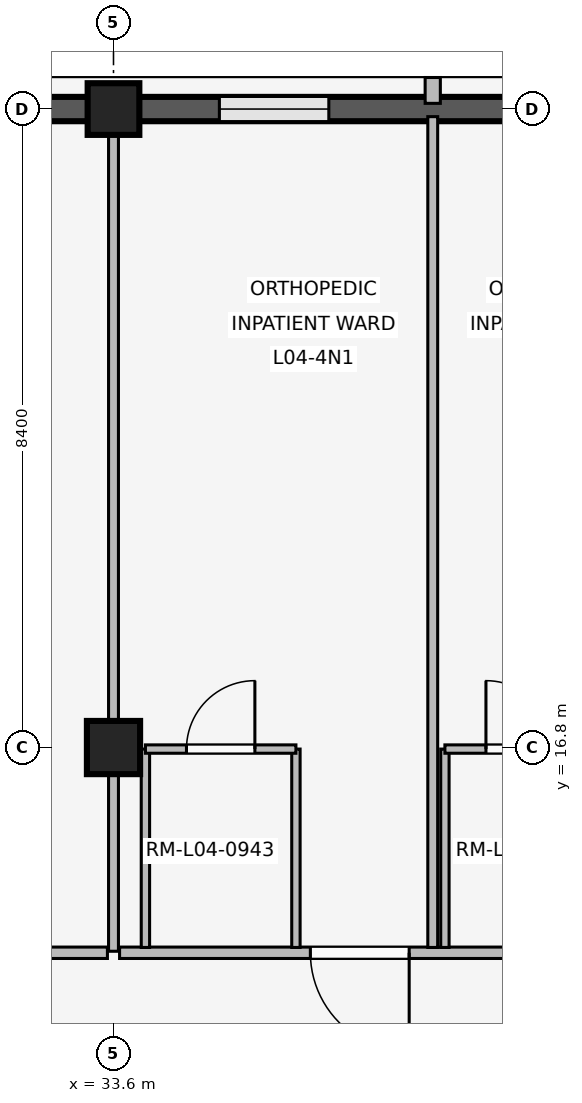
"""IFC4 building model, lengths in metres.
Left out: names, types, materials, properties, quantities, classifications, styles, units other than length and angle.
Written with IfcOpenShell. Run it as: python <this file> out.ifc"""

import sys

from ifc_helpers import new_model, si_unit, direction, frame, frame_2d, origin, origin_2d, place, context, subcontext, project, spatial, rectangle, extrude, element, fill, save


model = new_model("IFC4")
c1 = context("Model", 3, precision=1e-05, world=origin(), true_north=direction((0.0, 1.0)))
c2 = subcontext(c1, "Body", "Model", "MODEL_VIEW")
j1 = project(units=[si_unit("LENGTHUNIT", "METRE"), si_unit("PLANEANGLEUNIT", "RADIAN")], contexts=[c1])
p1 = place(None, origin())
s1 = spatial("IfcSite", under=j1, at=p1, CompositionType="ELEMENT")
p2 = place(p1, origin())
s2 = spatial("IfcBuilding", under=s1, at=p2, CompositionType="ELEMENT")
p3 = place(p2, frame((0.0, 0.0, 16.2)))
s3 = spatial("IfcBuildingStorey", under=s2, at=p3, CompositionType="ELEMENT", Elevation=16.2)
p4 = place(p3, frame((33.6, 16.8, 0.0), z_axis=(0.0, 0.0, 1.0), x_axis=(1.0, 0.0, 0.0)))
e1 = element("IfcColumn", 1, at=p4, inside=s3, PredefinedType="COLUMN", context=c2, shape_type="SweptSolid", body=[
    extrude(rectangle(XDim=0.7, YDim=0.7, at=origin_2d()), origin(), (0.0, 0.0, 1.0), 4.2),
])
p5 = place(p3, frame((33.6, 25.2, 0.0), z_axis=(0.0, 0.0, 1.0), x_axis=(1.0, 0.0, 0.0)))
e2 = element("IfcColumn", 2, at=p5, inside=s3, PredefinedType="COLUMN", context=c2, shape_type="SweptSolid", body=[
    extrude(rectangle(XDim=0.68, YDim=0.68, at=origin_2d()), origin(), (0.0, 0.0, 1.0), 4.2),
])
p6 = place(p3, frame((25.535, 25.2, 0.0), z_axis=(0.0, 0.0, 1.0), x_axis=(1.0, 0.0, 0.0)))
e3 = element("IfcWall", 3, at=p6, inside=s3, PredefinedType="SOLIDWALL", context=c2, shape_type="SweptSolid", body=[
    extrude(rectangle(XDim=7.73, YDim=0.32, at=frame_2d((3.865, 0.0))), origin(), (0.0, 0.0, 1.0), 3.32),
])
p7 = place(p6, frame((0.968, 0.0, 0.85)))
e4 = element("IfcOpeningElement", 4, at=p7, cuts=e3, PredefinedType="OPENING", context=c2, shape_type="SweptSolid", body=[
    extrude(rectangle(XDim=1.62, YDim=1.8, at=frame_2d((0.81, 0.9))), frame((0.0, 0.17, 0.0), z_axis=(0.0, -1.0, 0.0), x_axis=(1.0, 0.0, 0.0)), (0.0, 0.0, 1.0), 0.34),
])
p8 = place(p6, frame((5.142, 0.0, 0.85)))
e5 = element("IfcOpeningElement", 5, at=p8, cuts=e3, PredefinedType="OPENING", context=c2, shape_type="SweptSolid", body=[
    extrude(rectangle(XDim=1.62, YDim=1.8, at=frame_2d((0.81, 0.9))), frame((0.0, 0.17, 0.0), z_axis=(0.0, -1.0, 0.0), x_axis=(1.0, 0.0, 0.0)), (0.0, 0.0, 1.0), 0.34),
])
p9 = place(p3, frame((33.935, 25.2, 0.0), z_axis=(0.0, 0.0, 1.0), x_axis=(1.0, 0.0, 0.0)))
e6 = element("IfcWall", 6, at=p9, inside=s3, PredefinedType="SOLIDWALL", context=c2, shape_type="SweptSolid", body=[
    extrude(rectangle(XDim=7.73, YDim=0.32, at=frame_2d((3.865, 0.0))), origin(), (0.0, 0.0, 1.0), 3.32),
])
p10 = place(p9, frame((1.058, 0.0, 0.85)))
e7 = element("IfcOpeningElement", 7, at=p10, cuts=e6, PredefinedType="OPENING", context=c2, shape_type="SweptSolid", body=[
    extrude(rectangle(XDim=1.44, YDim=1.62, at=frame_2d((0.72, 0.81))), frame((0.0, 0.17, 0.0), z_axis=(0.0, -1.0, 0.0), x_axis=(1.0, 0.0, 0.0)), (0.0, 0.0, 1.0), 0.34),
])
p11 = place(p9, frame((5.232, 0.0, 0.85)))
e8 = element("IfcOpeningElement", 8, at=p11, cuts=e6, PredefinedType="OPENING", context=c2, shape_type="SweptSolid", body=[
    extrude(rectangle(XDim=1.44, YDim=1.62, at=frame_2d((0.72, 0.81))), frame((0.0, 0.17, 0.0), z_axis=(0.0, -1.0, 0.0), x_axis=(1.0, 0.0, 0.0)), (0.0, 0.0, 1.0), 0.34),
])
p12 = place(p3, frame((37.8, 25.275, 0.0), z_axis=(0.0, 0.0, 1.0), x_axis=(0.0, 1.0, 0.0)))
e9 = element("IfcWall", 9, at=p12, inside=s3, PredefinedType="ELEMENTEDWALL", context=c2, shape_type="SweptSolid", body=[
    extrude(rectangle(XDim=0.34, YDim=0.2, at=frame_2d((0.17, 0.0))), origin(), (0.0, 0.0, 1.0), 3.3),
])
p13 = place(p3, frame((33.52, 14.1, 0.0), z_axis=(0.0, 0.0, 1.0), x_axis=(-1.0, 0.0, 0.0)))
e10 = element("IfcWall", 10, at=p13, inside=s3, PredefinedType="PARTITIONING", context=c2, shape_type="SweptSolid", body=[
    extrude(rectangle(XDim=8.24, YDim=0.15, at=frame_2d((4.12, 0.0))), origin(), (0.0, 0.0, 1.0), 3.3),
])
p14 = place(p13, frame((3.495, 0.0, 0.0)))
e11 = element("IfcOpeningElement", 11, at=p14, cuts=e10, PredefinedType="OPENING", context=c2, shape_type="SweptSolid", body=[
    extrude(rectangle(XDim=1.25, YDim=2.2, at=frame_2d((0.625, 1.1))), frame((0.0, 0.085, 0.0), z_axis=(0.0, -1.0, 0.0), x_axis=(1.0, 0.0, 0.0)), (0.0, 0.0, 1.0), 0.17),
])
p15 = place(p3, frame((33.6, 14.12, 0.0), z_axis=(0.0, 0.0, 1.0), x_axis=(0.0, 1.0, 0.0)))
e12 = element("IfcWall", 12, at=p15, inside=s3, PredefinedType="PARTITIONING", context=c2, shape_type="SweptSolid", body=[
    extrude(rectangle(XDim=10.94, YDim=0.13, at=frame_2d((5.47, 0.0))), origin(), (0.0, 0.0, 1.0), 3.3),
])
p16 = place(p3, frame((41.64, 14.1, 0.0), z_axis=(0.0, 0.0, 1.0), x_axis=(-1.0, 0.0, 0.0)))
e13 = element("IfcWall", 13, at=p16, inside=s3, PredefinedType="PARTITIONING", context=c2, shape_type="SweptSolid", body=[
    extrude(rectangle(XDim=7.96, YDim=0.15, at=frame_2d((3.98, 0.0))), origin(), (0.0, 0.0, 1.0), 3.3),
])
p17 = place(p16, frame((0.45, 0.0, 0.0)))
e14 = element("IfcOpeningElement", 14, at=p17, cuts=e13, PredefinedType="OPENING", context=c2, shape_type="SweptSolid", body=[
    extrude(rectangle(XDim=1.3, YDim=2.25, at=frame_2d((0.65, 1.125))), frame((0.0, 0.085, 0.0), z_axis=(0.0, -1.0, 0.0), x_axis=(1.0, 0.0, 0.0)), (0.0, 0.0, 1.0), 0.17),
])
p18 = place(p16, frame((4.15, 0.0, 0.0)))
e15 = element("IfcOpeningElement", 15, at=p18, cuts=e13, PredefinedType="OPENING", context=c2, shape_type="SweptSolid", body=[
    extrude(rectangle(XDim=1.3, YDim=2.25, at=frame_2d((0.65, 1.125))), frame((0.0, 0.085, 0.0), z_axis=(0.0, -1.0, 0.0), x_axis=(1.0, 0.0, 0.0)), (0.0, 0.0, 1.0), 0.17),
])
p19 = place(p3, frame((37.8, 14.17, 0.0), z_axis=(0.0, 0.0, 1.0), x_axis=(0.0, 1.0, 0.0)))
e16 = element("IfcWall", 16, at=p19, inside=s3, PredefinedType="PARTITIONING", context=c2, shape_type="SweptSolid", body=[
    extrude(rectangle(XDim=10.93, YDim=0.13, at=frame_2d((5.465, 0.0))), origin(), (0.0, 0.0, 1.0), 3.3),
])
for number, where, z_axis, x_axis in (
    (17, (34.02, 14.17, 0.0), (0.0, 0.0, 1.0), (0.0, 1.0, 0.0)),
    (18, (36.0, 14.17, 0.0), (0.0, 0.0, 1.0), (0.0, 1.0, 0.0)),
):
    element("IfcWall", number, at=place(p3, frame(where, z_axis=z_axis, x_axis=x_axis)), inside=s3, PredefinedType="PARTITIONING", context=c2, shape_type="SweptSolid", body=[
        extrude(rectangle(XDim=2.61, YDim=0.11, at=frame_2d((1.305, 0.0))), origin(), (0.0, 0.0, 1.0), 3.3),
    ])
p20 = place(p3, frame((34.02, 16.78, 0.0), z_axis=(0.0, 0.0, 1.0), x_axis=(1.0, 0.0, 0.0)))
e19 = element("IfcWall", 19, at=p20, inside=s3, PredefinedType="PARTITIONING", context=c2, shape_type="SweptSolid", body=[
    extrude(rectangle(XDim=1.98, YDim=0.11, at=frame_2d((0.99, 0.0))), origin(), (0.0, 0.0, 1.0), 3.3),
])
p21 = place(p20, frame((0.54, 0.0, 0.0)))
e20 = element("IfcOpeningElement", 20, at=p21, cuts=e19, PredefinedType="OPENING", context=c2, shape_type="SweptSolid", body=[
    extrude(rectangle(XDim=0.9, YDim=2.1, at=frame_2d((0.45, 1.05))), frame((0.0, 0.065, 0.0), z_axis=(0.0, -1.0, 0.0), x_axis=(1.0, 0.0, 0.0)), (0.0, 0.0, 1.0), 0.13),
])
p22 = place(p3, frame((37.96, 14.17, 0.0), z_axis=(0.0, 0.0, 1.0), x_axis=(0.0, 1.0, 0.0)))
e21 = element("IfcWall", 21, at=p22, inside=s3, PredefinedType="PARTITIONING", context=c2, shape_type="SweptSolid", body=[
    extrude(rectangle(XDim=2.61, YDim=0.11, at=frame_2d((1.305, 0.0))), origin(), (0.0, 0.0, 1.0), 3.3),
])
p23 = place(p3, frame((37.96, 16.78, 0.0), z_axis=(0.0, 0.0, 1.0), x_axis=(1.0, 0.0, 0.0)))
e22 = element("IfcWall", 22, at=p23, inside=s3, PredefinedType="PARTITIONING", context=c2, shape_type="SweptSolid", body=[
    extrude(rectangle(XDim=1.98, YDim=0.11, at=frame_2d((0.99, 0.0))), origin(), (0.0, 0.0, 1.0), 3.3),
])
p24 = place(p23, frame((0.54, 0.0, 0.0)))
e23 = element("IfcOpeningElement", 23, at=p24, cuts=e22, PredefinedType="OPENING", context=c2, shape_type="SweptSolid", body=[
    extrude(rectangle(XDim=0.9, YDim=2.1, at=frame_2d((0.45, 1.05))), frame((0.0, 0.065, 0.0), z_axis=(0.0, -1.0, 0.0), x_axis=(1.0, 0.0, 0.0)), (0.0, 0.0, 1.0), 0.13),
])
p25 = place(p10, origin())
e24 = element("IfcWindow", 24, at=p25, inside=s3, PartitioningType="SINGLE_PANEL", PredefinedType="WINDOW", context=c2, shape_type="SweptSolid", body=[
    extrude(rectangle(XDim=1.44, YDim=1.62, at=frame_2d((0.72, 0.81))), frame((0.0, 0.03, 0.0), z_axis=(0.0, -1.0, 0.0), x_axis=(1.0, 0.0, 0.0)), (0.0, 0.0, 1.0), 0.06),
])
fill(e7, e24)
p26 = place(p18, origin())
e25 = element("IfcDoor", 25, at=p26, inside=s3, OperationType="SINGLE_SWING_LEFT", PredefinedType="DOOR", context=c2, shape_type="SweptSolid", body=[
    extrude(rectangle(XDim=1.3, YDim=2.25, at=frame_2d((0.65, 1.125))), frame((0.0, 0.025, 0.0), z_axis=(0.0, -1.0, 0.0), x_axis=(1.0, 0.0, 0.0)), (0.0, 0.0, 1.0), 0.05),
])
fill(e15, e25)
p27 = place(p21, origin())
e26 = element("IfcDoor", 26, at=p27, inside=s3, OperationType="SINGLE_SWING_RIGHT", PredefinedType="DOOR", context=c2, shape_type="SweptSolid", body=[
    extrude(rectangle(XDim=0.9, YDim=2.1, at=frame_2d((0.45, 1.05))), frame((0.0, 0.025, 0.0), z_axis=(0.0, -1.0, 0.0), x_axis=(1.0, 0.0, 0.0)), (0.0, 0.0, 1.0), 0.05),
])
fill(e20, e26)
p28 = place(p24, origin())
e27 = element("IfcDoor", 27, at=p28, inside=s3, OperationType="SINGLE_SWING_LEFT", PredefinedType="DOOR", context=c2, shape_type="SweptSolid", body=[
    extrude(rectangle(XDim=0.9, YDim=2.1, at=frame_2d((0.45, 1.05))), frame((0.0, 0.025, 0.0), z_axis=(0.0, -1.0, 0.0), x_axis=(1.0, 0.0, 0.0)), (0.0, 0.0, 1.0), 0.05),
])
fill(e23, e27)
save(model, sys.argv[1])
